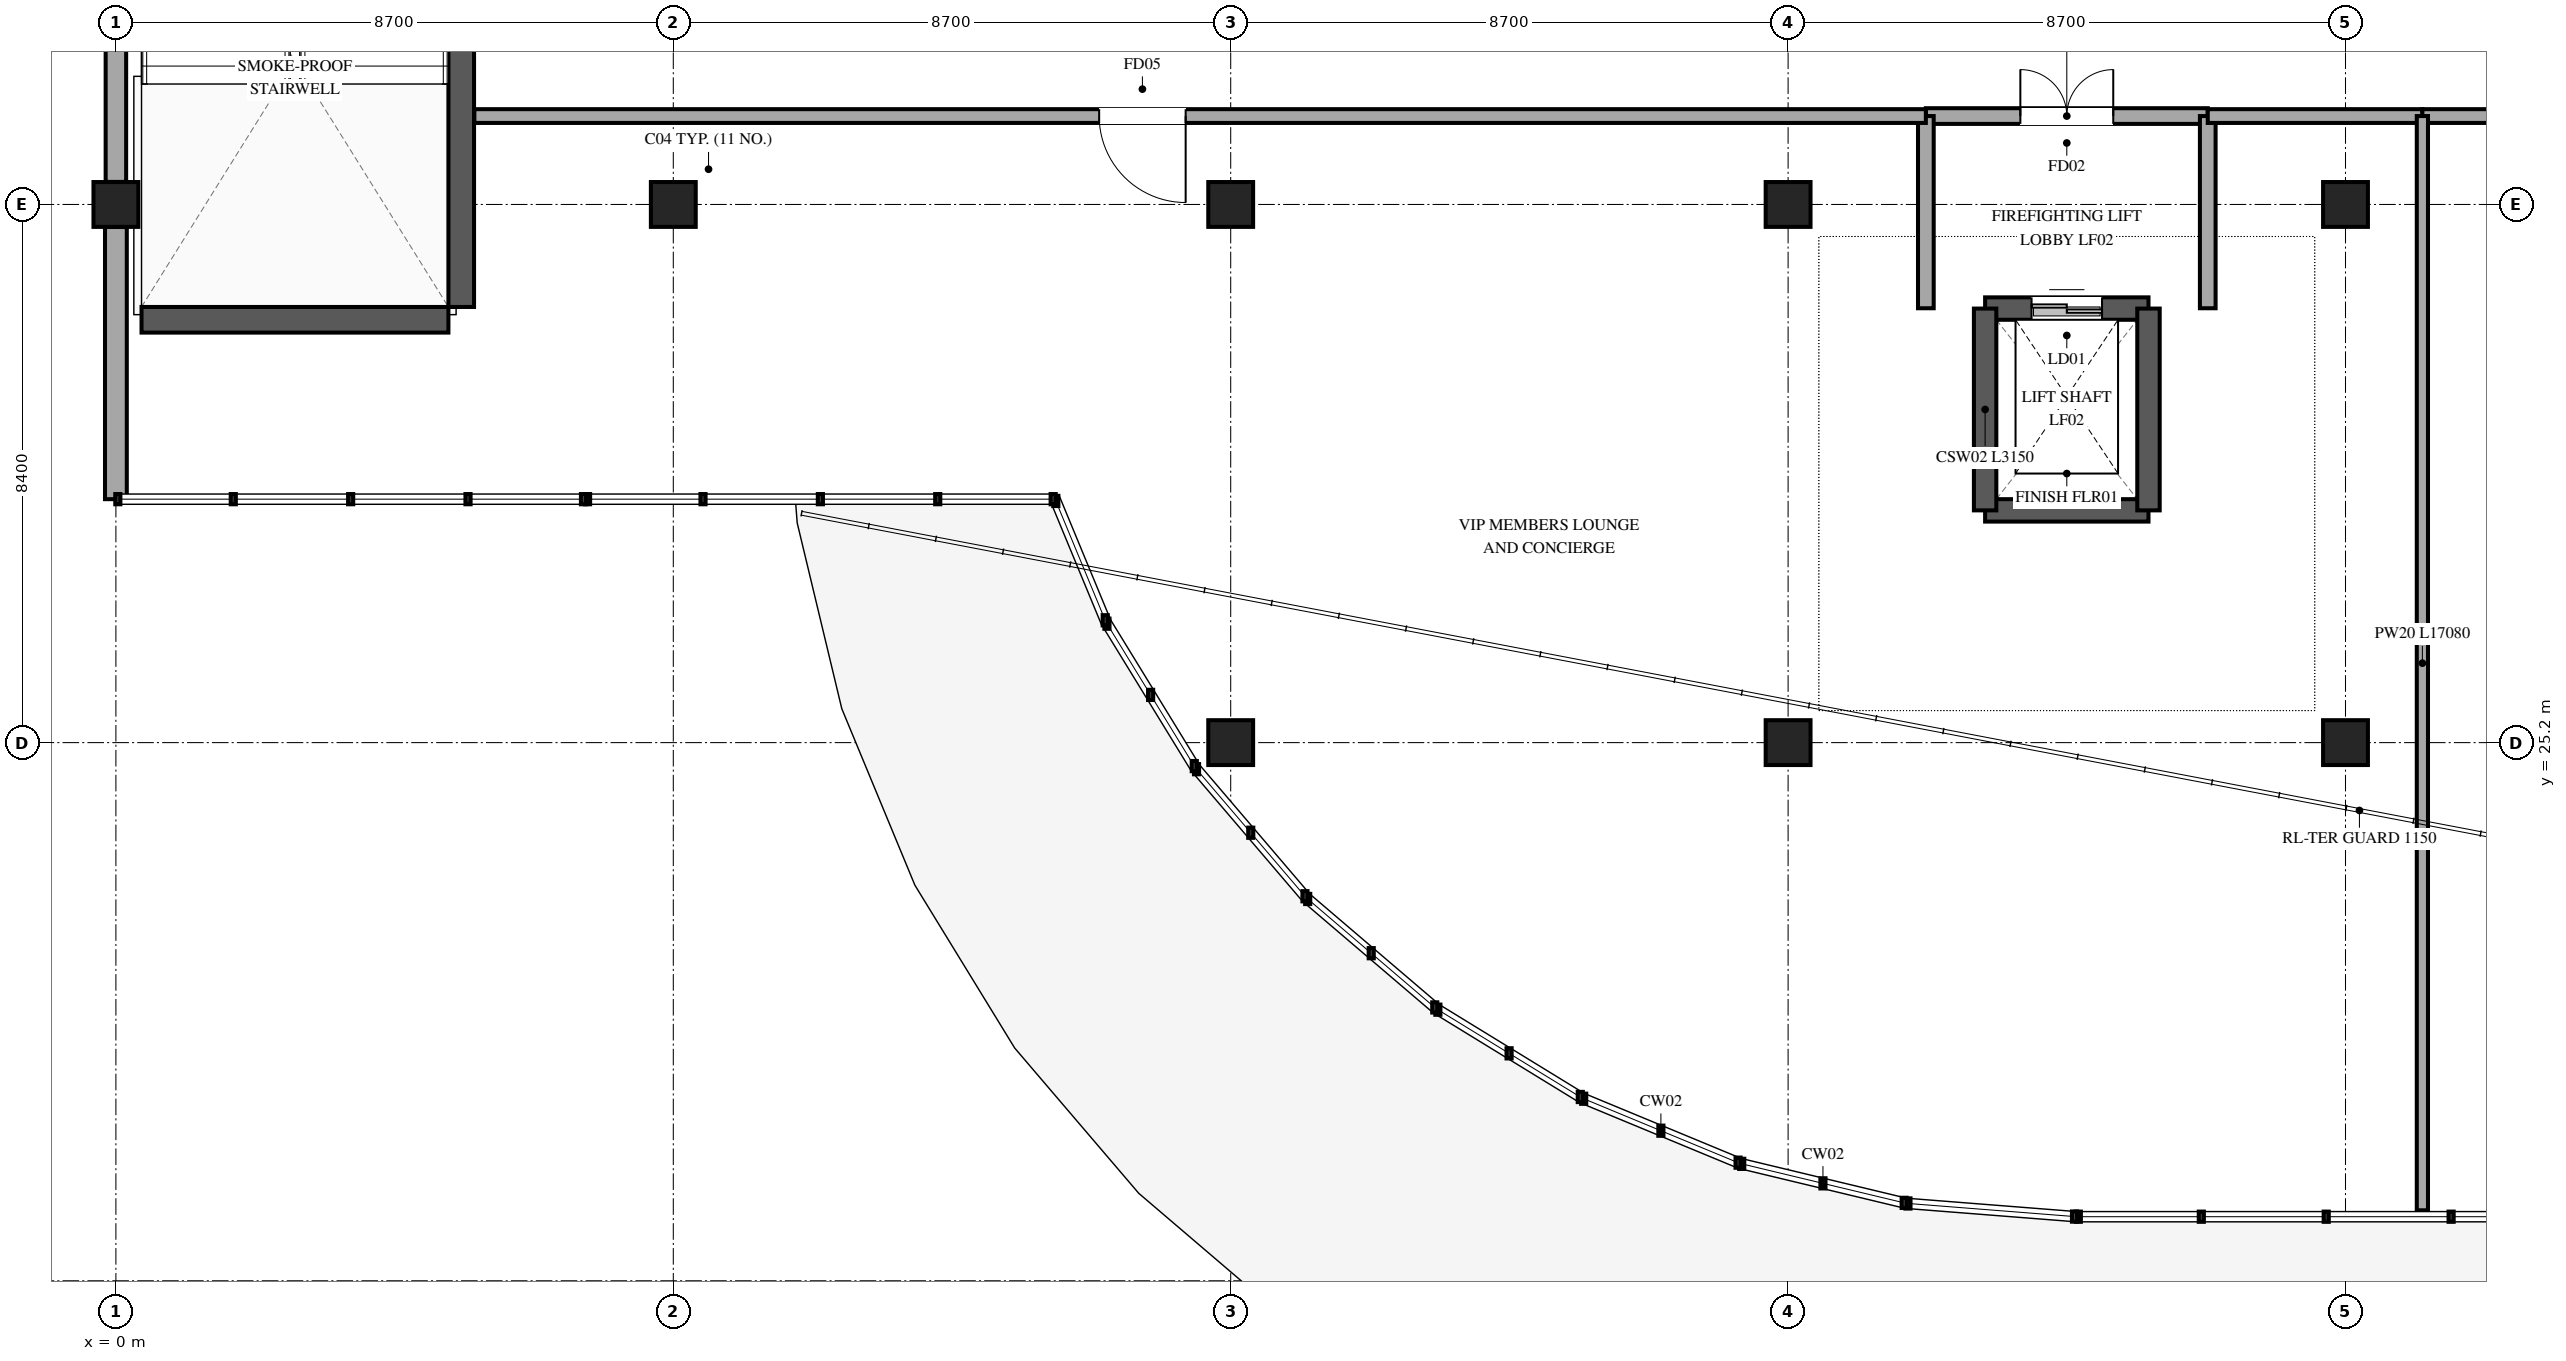
"""IFC4 building model, lengths in metres.
Left out: names, types, materials, properties, quantities, classifications, styles, units other than length and angle.
Written with IfcOpenShell. Run it as: python <this file> out.ifc"""

import sys

from ifc_helpers import new_model, si_unit, direction, frame, frame_2d, origin, origin_2d, place, context, subcontext, project, spatial, rectangle, extrude, element, fill, save


model = new_model("IFC4")
c1 = context("Model", 3, precision=1e-05, world=origin(), true_north=direction((0.0, 1.0)))
c2 = subcontext(c1, "Body", "Model", "MODEL_VIEW")
j1 = project(units=[si_unit("LENGTHUNIT", "METRE"), si_unit("PLANEANGLEUNIT", "RADIAN")], contexts=[c1])
p1 = place(None, origin())
s1 = spatial("IfcSite", under=j1, at=p1, CompositionType="ELEMENT")
p2 = place(p1, origin())
s2 = spatial("IfcBuilding", under=s1, at=p2, CompositionType="ELEMENT")
p3 = place(p2, frame((0.0, 0.0, 31.5)))
s3 = spatial("IfcBuildingStorey", under=s2, at=p3, CompositionType="ELEMENT", Elevation=31.5)
for number, where, z_axis, x_axis in (
    (1, (0.0, 33.6, 0.0), (0.0, 0.0, 1.0), (1.0, 0.0, 0.0)),
    (2, (8.7, 33.6, 0.0), (0.0, 0.0, 1.0), (1.0, 0.0, 0.0)),
    (3, (17.4, 25.2, 0.0), (0.0, 0.0, 1.0), (1.0, 0.0, 0.0)),
    (4, (17.4, 33.6, 0.0), (0.0, 0.0, 1.0), (1.0, 0.0, 0.0)),
    (5, (26.1, 25.2, 0.0), (0.0, 0.0, 1.0), (1.0, 0.0, 0.0)),
    (6, (26.1, 33.6, 0.0), (0.0, 0.0, 1.0), (1.0, 0.0, 0.0)),
    (7, (34.8, 25.2, 0.0), (0.0, 0.0, 1.0), (1.0, 0.0, 0.0)),
    (8, (34.8, 33.6, 0.0), (0.0, 0.0, 1.0), (1.0, 0.0, 0.0)),
):
    element("IfcColumn", number, at=place(p3, frame(where, z_axis=z_axis, x_axis=x_axis)), inside=s3, PredefinedType="COLUMN", context=c2, shape_type="SweptSolid", body=[
        extrude(rectangle(XDim=0.7, YDim=0.7, at=origin_2d()), origin(), (0.0, 0.0, 1.0), 4.8),
    ])
p4 = place(p3, frame((0.0, 29.0, 0.0), z_axis=(0.0, 0.0, 1.0), x_axis=(0.0, 1.0, 0.0)))
e9 = element("IfcWall", 9, at=p4, inside=s3, PredefinedType="STANDARD", context=c2, shape_type="SweptSolid", body=[
    extrude(rectangle(XDim=4.248, YDim=0.34, at=frame_2d((2.124, 0.0))), origin(), (0.0, 0.0, 1.0), 4.49),
])
p5 = place(p3, frame((0.0, 33.952, 0.0), z_axis=(0.0, 0.0, 1.0), x_axis=(0.0, 1.0, 0.0)))
e10 = element("IfcWall", 10, at=p5, inside=s3, PredefinedType="STANDARD", context=c2, shape_type="SweptSolid", body=[
    extrude(rectangle(XDim=7.696, YDim=0.32, at=frame_2d((3.848, 0.0))), origin(), (0.0, 0.0, 1.0), 4.49),
])
p6 = place(p3, frame((5.39, 42.0, 0.0), z_axis=(0.0, 0.0, 1.0), x_axis=(0.0, -1.0, 0.0)))
e11 = element("IfcWall", 11, at=p6, inside=s3, PredefinedType="SHEAR", context=c2, shape_type="SweptSolid", body=[
    extrude(rectangle(XDim=10.0, YDim=0.4, at=frame_2d((5.0, 0.0))), origin(), (0.0, 0.0, 1.0), 4.8),
])
p7 = place(p6, frame((0.41, 0.0, 0.0)))
e12 = element("IfcOpeningElement", 12, at=p7, cuts=e11, PredefinedType="OPENING", context=c2, shape_type="SweptSolid", body=[
    extrude(rectangle(XDim=1.5, YDim=2.2, at=frame_2d((0.75, 1.1))), frame((0.0, 0.21, 0.0), z_axis=(0.0, -1.0, 0.0), x_axis=(1.0, 0.0, 0.0)), (0.0, 0.0, 1.0), 0.42),
])
p8 = place(p3, frame((5.19, 31.8, 0.0), z_axis=(0.0, 0.0, 1.0), x_axis=(-1.0, 0.0, 0.0)))
e13 = element("IfcWall", 13, at=p8, inside=s3, PredefinedType="SHEAR", context=c2, shape_type="SweptSolid", body=[
    extrude(rectangle(XDim=4.79, YDim=0.4, at=frame_2d((2.395, 0.0))), origin(), (0.0, 0.0, 1.0), 4.8),
])
p9 = place(p3, frame((29.175, 31.975, 0.0), z_axis=(0.0, 0.0, 1.0), x_axis=(1.0, 0.0, 0.0)))
e14 = element("IfcWall", 14, at=p9, inside=s3, PredefinedType="SHEAR", context=c2, shape_type="SweptSolid", body=[
    extrude(rectangle(XDim=2.55, YDim=0.35, at=frame_2d((1.275, 0.0))), origin(), (0.0, 0.0, 1.0), 4.8),
])
p10 = place(p9, frame((0.725, 0.0, 0.0)))
e15 = element("IfcOpeningElement", 15, at=p10, cuts=e14, PredefinedType="OPENING", context=c2, shape_type="SweptSolid", body=[
    extrude(rectangle(XDim=1.1, YDim=2.2, at=frame_2d((0.55, 1.1))), frame((0.0, 0.185, 0.0), z_axis=(0.0, -1.0, 0.0), x_axis=(1.0, 0.0, 0.0)), (0.0, 0.0, 1.0), 0.37),
])
p11 = place(p3, frame((31.725, 28.825, 0.0), z_axis=(0.0, 0.0, 1.0), x_axis=(-1.0, 0.0, 0.0)))
e16 = element("IfcWall", 16, at=p11, inside=s3, PredefinedType="SHEAR", context=c2, shape_type="SweptSolid", body=[
    extrude(rectangle(XDim=2.55, YDim=0.35, at=frame_2d((1.275, 0.0))), origin(), (0.0, 0.0, 1.0), 4.8),
])
for number, where, z_axis, x_axis in (
    (17, (29.175, 28.825, 0.0), (0.0, 0.0, 1.0), (0.0, 1.0, 0.0)),
    (18, (31.725, 31.975, 0.0), (0.0, 0.0, 1.0), (0.0, -1.0, 0.0)),
):
    element("IfcWall", number, at=place(p3, frame(where, z_axis=z_axis, x_axis=x_axis)), inside=s3, PredefinedType="SHEAR", context=c2, shape_type="SweptSolid", body=[
        extrude(rectangle(XDim=3.15, YDim=0.35, at=frame_2d((1.575, 0.0))), origin(), (0.0, 0.0, 1.0), 4.8),
    ])
p12 = place(p3, frame((28.25, 34.98, 0.0), z_axis=(0.0, 0.0, 1.0), x_axis=(1.0, 0.0, 0.0)))
e19 = element("IfcWall", 19, at=p12, inside=s3, PredefinedType="STANDARD", context=c2, shape_type="SweptSolid", body=[
    extrude(rectangle(XDim=4.4, YDim=0.245, at=frame_2d((2.2, 0.0))), origin(), (0.0, 0.0, 1.0), 4.46),
])
p13 = place(p12, frame((1.475, 0.0, 0.0)))
e20 = element("IfcOpeningElement", 20, at=p13, cuts=e19, PredefinedType="OPENING", context=c2, shape_type="SweptSolid", body=[
    extrude(rectangle(XDim=1.45, YDim=2.2, at=frame_2d((0.725, 1.1))), frame((0.0, 0.133, 0.0), z_axis=(0.0, -1.0, 0.0), x_axis=(1.0, 0.0, 0.0)), (0.0, 0.0, 1.0), 0.265),
])
for number, where, z_axis, x_axis in (
    (21, (28.25, 31.98, 0.0), (0.0, 0.0, 1.0), (0.0, 1.0, 0.0)),
    (22, (32.65, 34.98, 0.0), (0.0, 0.0, 1.0), (0.0, -1.0, 0.0)),
):
    element("IfcWall", number, at=place(p3, frame(where, z_axis=z_axis, x_axis=x_axis)), inside=s3, PredefinedType="STANDARD", context=c2, shape_type="SweptSolid", body=[
        extrude(rectangle(XDim=3.0, YDim=0.245, at=frame_2d((1.5, 0.0))), origin(), (0.0, 0.0, 1.0), 3.76),
    ])
p14 = place(p3, frame((28.25, 34.98, 0.0), z_axis=(0.0, 0.0, 1.0), x_axis=(-1.0, 0.0, 0.0)))
e23 = element("IfcWall", 23, at=p14, inside=s3, PredefinedType="PARTITIONING", context=c2, shape_type="SweptSolid", body=[
    extrude(rectangle(XDim=22.655, YDim=0.215, at=frame_2d((11.328, 0.0))), origin(), (0.0, 0.0, 1.0), 3.76),
])
p15 = place(p14, frame((11.553, 0.0, 0.0)))
e24 = element("IfcOpeningElement", 24, at=p15, cuts=e23, PredefinedType="OPENING", context=c2, shape_type="SweptSolid", body=[
    extrude(rectangle(XDim=1.35, YDim=2.2, at=frame_2d((0.675, 1.1))), frame((0.0, 0.118, 0.0), z_axis=(0.0, -1.0, 0.0), x_axis=(1.0, 0.0, 0.0)), (0.0, 0.0, 1.0), 0.235),
])
p16 = place(p3, frame((36.0, 34.98, 0.0), z_axis=(0.0, 0.0, 1.0), x_axis=(-1.0, 0.0, 0.0)))
e25 = element("IfcWall", 25, at=p16, inside=s3, PredefinedType="PARTITIONING", context=c2, shape_type="SweptSolid", body=[
    extrude(rectangle(XDim=3.35, YDim=0.215, at=frame_2d((1.675, 0.0))), origin(), (0.0, 0.0, 1.0), 3.76),
])
p17 = place(p3, frame((44.6, 34.98, 0.0), z_axis=(0.0, 0.0, 1.0), x_axis=(-1.0, 0.0, 0.0)))
e26 = element("IfcWall", 26, at=p17, inside=s3, PredefinedType="PARTITIONING", context=c2, shape_type="SweptSolid", body=[
    extrude(rectangle(XDim=8.6, YDim=0.215, at=frame_2d((4.3, 0.0))), origin(), (0.0, 0.0, 1.0), 3.76),
])
p18 = place(p17, frame((3.625, 0.0, 0.0)))
e27 = element("IfcOpeningElement", 27, at=p18, cuts=e26, PredefinedType="OPENING", context=c2, shape_type="SweptSolid", body=[
    extrude(rectangle(XDim=1.35, YDim=2.2, at=frame_2d((0.675, 1.1))), frame((0.0, 0.118, 0.0), z_axis=(0.0, -1.0, 0.0), x_axis=(1.0, 0.0, 0.0)), (0.0, 0.0, 1.0), 0.235),
])
p19 = place(p3, frame((36.0, 34.98, 0.0), z_axis=(0.0, 0.0, 1.0), x_axis=(0.0, -1.0, 0.0)))
e28 = element("IfcWall", 28, at=p19, inside=s3, PredefinedType="PARTITIONING", context=c2, shape_type="SweptSolid", body=[
    extrude(rectangle(XDim=17.08, YDim=0.175, at=frame_2d((8.54, 0.0))), origin(), (0.0, 0.0, 1.0), 3.76),
])
p20 = place(p10, origin())
e29 = element("IfcDoor", 29, at=p20, inside=s3, OperationType="DOUBLE_DOOR_SLIDING", PredefinedType="DOOR", context=c2, shape_type="SweptSolid", body=[
    extrude(rectangle(XDim=1.1, YDim=2.2, at=frame_2d((0.55, 1.1))), frame((0.0, 0.025, 0.0), z_axis=(0.0, -1.0, 0.0), x_axis=(1.0, 0.0, 0.0)), (0.0, 0.0, 1.0), 0.05),
])
fill(e15, e29)
p21 = place(p13, origin())
e30 = element("IfcDoor", 30, at=p21, inside=s3, OperationType="DOUBLE_DOOR_SINGLE_SWING", PredefinedType="DOOR", context=c2, shape_type="SweptSolid", body=[
    extrude(rectangle(XDim=1.45, YDim=2.2, at=frame_2d((0.725, 1.1))), frame((0.0, 0.025, 0.0), z_axis=(0.0, -1.0, 0.0), x_axis=(1.0, 0.0, 0.0)), (0.0, 0.0, 1.0), 0.05),
])
fill(e20, e30)
p22 = place(p15, origin())
e31 = element("IfcDoor", 31, at=p22, inside=s3, OperationType="SINGLE_SWING_LEFT", PredefinedType="DOOR", context=c2, shape_type="SweptSolid", body=[
    extrude(rectangle(XDim=1.35, YDim=2.2, at=frame_2d((0.675, 1.1))), frame((0.0, 0.025, 0.0), z_axis=(0.0, -1.0, 0.0), x_axis=(1.0, 0.0, 0.0)), (0.0, 0.0, 1.0), 0.05),
])
fill(e24, e31)
save(model, sys.argv[1])
